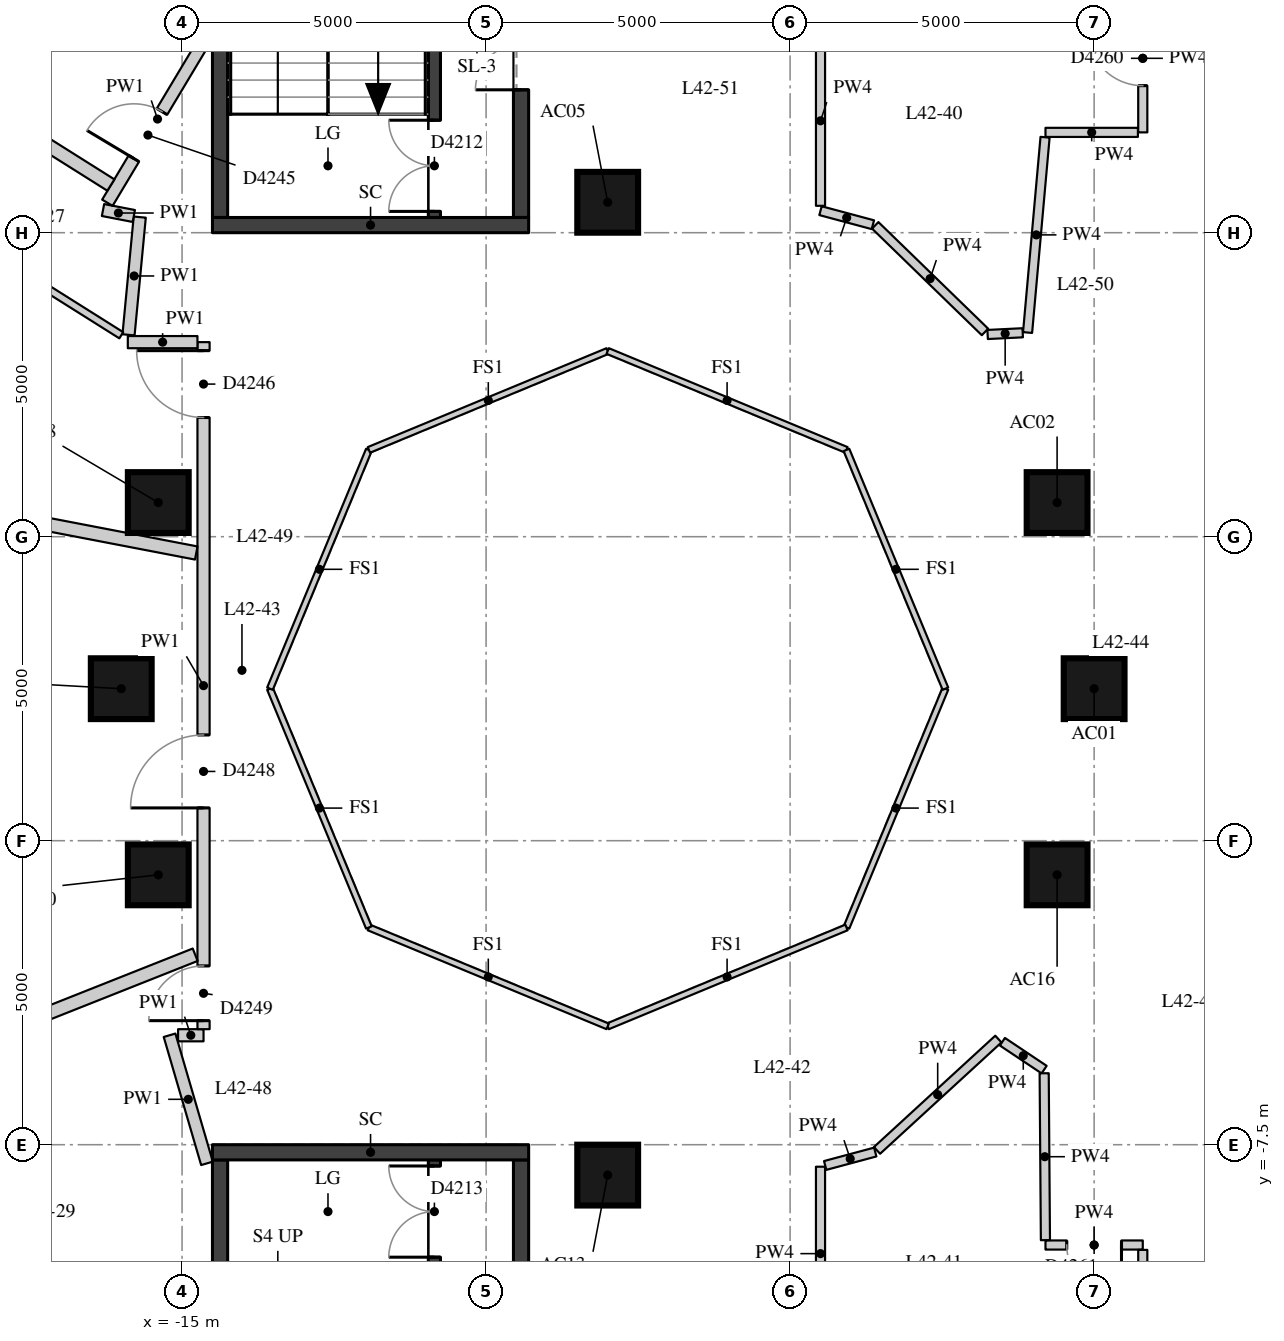
"""IFC4 building model, lengths in metres.
Left out: names, types, materials, properties, quantities, classifications, styles, units other than length and angle.
Written with IfcOpenShell. Run it as: python <this file> out.ifc"""

import sys

from ifc_helpers import new_model, si_unit, direction, frame, frame_2d, origin, origin_2d, place, context, subcontext, project, spatial, rectangle, extrude, element, fill, save


model = new_model("IFC4")
c1 = context("Model", 3, precision=1e-05, world=origin(), true_north=direction((0.0, 1.0)))
c2 = subcontext(c1, "Body", "Model", "MODEL_VIEW")
j1 = project(units=[si_unit("LENGTHUNIT", "METRE"), si_unit("PLANEANGLEUNIT", "RADIAN")], contexts=[c1])
p1 = place(None, origin())
s1 = spatial("IfcSite", under=j1, at=p1, CompositionType="ELEMENT")
p2 = place(p1, origin())
s2 = spatial("IfcBuilding", under=s1, at=p2, CompositionType="ELEMENT")
p3 = place(p2, frame((0.0, 0.0, 151.7)))
s3 = spatial("IfcBuildingStorey", under=s2, at=p3, CompositionType="ELEMENT", Elevation=151.7)
for number, where, z_axis, x_axis in (
    (1, (0.0, 0.0, 0.0), (0.0, 0.0, 1.0), (1.0, 0.0, 0.0)),
    (2, (-0.609, 3.062, 0.0), (0.0, 0.0, 1.0), (1.0, 0.0, 0.0)),
    (3, (-8.0, 8.0, 0.0), (0.0, 0.0, 1.0), (1.0, 0.0, 0.0)),
    (4, (-15.391, 3.062, 0.0), (0.0, 0.0, 1.0), (1.0, 0.0, 0.0)),
    (5, (-16.0, 0.0, 0.0), (0.0, 0.0, 1.0), (1.0, 0.0, 0.0)),
    (6, (-15.391, -3.062, 0.0), (0.0, 0.0, 1.0), (1.0, 0.0, 0.0)),
    (7, (-8.0, -8.0, 0.0), (0.0, 0.0, 1.0), (1.0, 0.0, 0.0)),
    (8, (-0.609, -3.062, 0.0), (0.0, 0.0, 1.0), (1.0, 0.0, 0.0)),
):
    element("IfcColumn", number, at=place(p3, frame(where, z_axis=z_axis, x_axis=x_axis)), inside=s3, PredefinedType="COLUMN", context=c2, shape_type="SweptSolid", body=[
        extrude(rectangle(XDim=1.0, YDim=1.0, at=origin_2d()), origin(), (0.0, 0.0, 1.0), 3.3),
    ])
p4 = place(p3, frame((-10.85, 7.75, 0.0), z_axis=(0.0, 0.0, 1.0), x_axis=(0.0, 1.0, 0.0)))
e9 = element("IfcWall", 9, at=p4, inside=s3, PredefinedType="SHEAR", context=c2, shape_type="SweptSolid", body=[
    extrude(rectangle(XDim=6.0, YDim=0.2, at=frame_2d((3.0, 0.0))), origin(), (0.0, 0.0, 1.0), 3.02),
])
p5 = place(p4, frame((0.1, 0.0, 0.0)))
e10 = element("IfcOpeningElement", 10, at=p5, cuts=e9, PredefinedType="OPENING", context=c2, shape_type="SweptSolid", body=[
    extrude(rectangle(XDim=1.5, YDim=2.1, at=frame_2d((0.75, 1.05))), frame((0.0, 0.11, 0.0), z_axis=(0.0, -1.0, 0.0), x_axis=(1.0, 0.0, 0.0)), (0.0, 0.0, 1.0), 0.22),
])
p6 = place(p3, frame((-10.85, -13.75, 0.0), z_axis=(0.0, 0.0, 1.0), x_axis=(0.0, 1.0, 0.0)))
e11 = element("IfcWall", 11, at=p6, inside=s3, PredefinedType="SHEAR", context=c2, shape_type="SweptSolid", body=[
    extrude(rectangle(XDim=6.0, YDim=0.2, at=frame_2d((3.0, 0.0))), origin(), (0.0, 0.0, 1.0), 3.02),
])
p7 = place(p6, frame((4.4, 0.0, 0.0)))
e12 = element("IfcOpeningElement", 12, at=p7, cuts=e11, PredefinedType="OPENING", context=c2, shape_type="SweptSolid", body=[
    extrude(rectangle(XDim=1.5, YDim=2.1, at=frame_2d((0.75, 1.05))), frame((0.0, 0.11, 0.0), z_axis=(0.0, -1.0, 0.0), x_axis=(1.0, 0.0, 0.0)), (0.0, 0.0, 1.0), 0.22),
])
p8 = place(p3, frame((-14.375, 7.75, -0.28), z_axis=(0.0, 0.0, 1.0), x_axis=(0.0, 1.0, 0.0)))
e13 = element("IfcWall", 13, at=p8, inside=s3, PredefinedType="SHEAR", context=c2, shape_type="SweptSolid", body=[
    extrude(rectangle(XDim=6.0, YDim=0.25, at=frame_2d((3.0, 0.0))), origin(), (0.0, 0.0, 1.0), 3.3),
])
p9 = place(p3, frame((-9.425, 7.75, -0.28), z_axis=(0.0, 0.0, 1.0), x_axis=(0.0, 1.0, 0.0)))
e14 = element("IfcWall", 14, at=p9, inside=s3, PredefinedType="SHEAR", context=c2, shape_type="SweptSolid", body=[
    extrude(rectangle(XDim=6.0, YDim=0.25, at=frame_2d((3.0, 0.0))), origin(), (0.0, 0.0, 1.0), 3.3),
])
p10 = place(p9, frame((2.1, 0.0, 0.28)))
e15 = element("IfcOpeningElement", 15, at=p10, cuts=e14, PredefinedType="OPENING", context=c2, shape_type="SweptSolid", body=[
    extrude(rectangle(XDim=1.5, YDim=2.1, at=frame_2d((0.75, 1.05))), frame((0.0, 0.135, 0.0), z_axis=(0.0, -1.0, 0.0), x_axis=(1.0, 0.0, 0.0)), (0.0, 0.0, 1.0), 0.27),
])
p11 = place(p3, frame((-14.5, 7.625, -0.28), z_axis=(0.0, 0.0, 1.0), x_axis=(1.0, 0.0, 0.0)))
e16 = element("IfcWall", 16, at=p11, inside=s3, PredefinedType="SHEAR", context=c2, shape_type="SweptSolid", body=[
    extrude(rectangle(XDim=5.2, YDim=0.25, at=frame_2d((2.6, 0.0))), origin(), (0.0, 0.0, 1.0), 3.3),
])
p12 = place(p3, frame((-14.375, -13.75, -0.28), z_axis=(0.0, 0.0, 1.0), x_axis=(0.0, 1.0, 0.0)))
e17 = element("IfcWall", 17, at=p12, inside=s3, PredefinedType="SHEAR", context=c2, shape_type="SweptSolid", body=[
    extrude(rectangle(XDim=6.0, YDim=0.25, at=frame_2d((3.0, 0.0))), origin(), (0.0, 0.0, 1.0), 3.3),
])
p13 = place(p3, frame((-9.425, -13.75, -0.28), z_axis=(0.0, 0.0, 1.0), x_axis=(0.0, 1.0, 0.0)))
e18 = element("IfcWall", 18, at=p13, inside=s3, PredefinedType="SHEAR", context=c2, shape_type="SweptSolid", body=[
    extrude(rectangle(XDim=6.0, YDim=0.25, at=frame_2d((3.0, 0.0))), origin(), (0.0, 0.0, 1.0), 3.3),
])
p14 = place(p13, frame((2.4, 0.0, 0.28)))
e19 = element("IfcOpeningElement", 19, at=p14, cuts=e18, PredefinedType="OPENING", context=c2, shape_type="SweptSolid", body=[
    extrude(rectangle(XDim=1.5, YDim=2.1, at=frame_2d((0.75, 1.05))), frame((0.0, 0.135, 0.0), z_axis=(0.0, -1.0, 0.0), x_axis=(1.0, 0.0, 0.0)), (0.0, 0.0, 1.0), 0.27),
])
p15 = place(p3, frame((-14.5, -7.625, -0.28), z_axis=(0.0, 0.0, 1.0), x_axis=(1.0, 0.0, 0.0)))
e20 = element("IfcWall", 20, at=p15, inside=s3, PredefinedType="SHEAR", context=c2, shape_type="SweptSolid", body=[
    extrude(rectangle(XDim=5.2, YDim=0.25, at=frame_2d((2.6, 0.0))), origin(), (0.0, 0.0, 1.0), 3.3),
])
p16 = place(p3, frame((-14.59, -7.807, 0.0), z_axis=(0.0, 0.0, 1.0), x_axis=(-0.280401457903, 0.959882817018, 0.0)))
e21 = element("IfcWall", 21, at=p16, inside=s3, PredefinedType="PARTITIONING", context=c2, shape_type="SweptSolid", body=[
    extrude(rectangle(XDim=2.195, YDim=0.2, at=frame_2d((1.098, 0.0))), origin(), (0.0, 0.0, 1.0), 3.02),
])
p17 = place(p3, frame((-15.065, -5.7, 0.0), z_axis=(0.0, 0.0, 1.0), x_axis=(1.0, 0.0, 0.0)))
e22 = element("IfcWall", 22, at=p17, inside=s3, PredefinedType="PARTITIONING", context=c2, shape_type="SweptSolid", body=[
    extrude(rectangle(XDim=0.419, YDim=0.2, at=frame_2d((0.209, 0.0))), origin(), (0.0, 0.0, 1.0), 3.02),
])
p18 = place(p3, frame((-14.647, -5.6, 0.0), z_axis=(0.0, 0.0, 1.0), x_axis=(0.0, 1.0, 0.0)))
e23 = element("IfcWall", 23, at=p18, inside=s3, PredefinedType="PARTITIONING", context=c2, shape_type="SweptSolid", body=[
    extrude(rectangle(XDim=11.3, YDim=0.2, at=frame_2d((5.65, 0.0))), origin(), (0.0, 0.0, 1.0), 3.02),
])
p19 = place(p18, frame((10.06, 0.0, 0.0)))
e24 = element("IfcOpeningElement", 24, at=p19, cuts=e23, PredefinedType="OPENING", context=c2, shape_type="SweptSolid", body=[
    extrude(rectangle(XDim=1.1, YDim=2.1, at=frame_2d((0.55, 1.05))), frame((0.0, 0.11, 0.0), z_axis=(0.0, -1.0, 0.0), x_axis=(1.0, 0.0, 0.0)), (0.0, 0.0, 1.0), 0.22),
])
p20 = place(p18, frame((3.639, 0.0, 0.0)))
e25 = element("IfcOpeningElement", 25, at=p20, cuts=e23, PredefinedType="OPENING", context=c2, shape_type="SweptSolid", body=[
    extrude(rectangle(XDim=1.2, YDim=2.1, at=frame_2d((0.6, 1.05))), frame((0.0, 0.11, 0.0), z_axis=(0.0, -1.0, 0.0), x_axis=(1.0, 0.0, 0.0)), (0.0, 0.0, 1.0), 0.22),
])
p21 = place(p18, frame((0.14, 0.0, 0.0)))
e26 = element("IfcOpeningElement", 26, at=p21, cuts=e23, PredefinedType="OPENING", context=c2, shape_type="SweptSolid", body=[
    extrude(rectangle(XDim=0.9, YDim=2.1, at=frame_2d((0.45, 1.05))), frame((0.0, 0.11, 0.0), z_axis=(0.0, -1.0, 0.0), x_axis=(1.0, 0.0, 0.0)), (0.0, 0.0, 1.0), 0.22),
])
p22 = place(p3, frame((-14.747, 5.7, 0.0), z_axis=(0.0, 0.0, 1.0), x_axis=(-1.0, 0.0, 0.0)))
e27 = element("IfcWall", 27, at=p22, inside=s3, PredefinedType="PARTITIONING", context=c2, shape_type="SweptSolid", body=[
    extrude(rectangle(XDim=1.145, YDim=0.2, at=frame_2d((0.573, 0.0))), origin(), (0.0, 0.0, 1.0), 3.02),
])
p23 = place(p3, frame((-15.88, 5.82, 0.0), z_axis=(0.0, 0.0, 1.0), x_axis=(0.094892019157, 0.995487571344, 0.0)))
e28 = element("IfcWall", 28, at=p23, inside=s3, PredefinedType="PARTITIONING", context=c2, shape_type="SweptSolid", body=[
    extrude(rectangle(XDim=1.945, YDim=0.2, at=frame_2d((0.973, 0.0))), origin(), (0.0, 0.0, 1.0), 3.02),
])
p24 = place(p3, frame((-15.793, 7.775, 0.0), z_axis=(0.0, 0.0, 1.0), x_axis=(-0.981833914825, 0.189742361371, 0.0)))
e29 = element("IfcWall", 29, at=p24, inside=s3, PredefinedType="PARTITIONING", context=c2, shape_type="SweptSolid", body=[
    extrude(rectangle(XDim=0.516, YDim=0.2, at=frame_2d((0.258, 0.0))), origin(), (0.0, 0.0, 1.0), 3.02),
])
p25 = place(p3, frame((-16.228, 7.992, 0.0), z_axis=(0.0, 0.0, 1.0), x_axis=(0.513936465122, 0.857828251935, 0.0)))
e30 = element("IfcWall", 30, at=p25, inside=s3, PredefinedType="PARTITIONING", context=c2, shape_type="SweptSolid", body=[
    extrude(rectangle(XDim=3.21, YDim=0.2, at=frame_2d((1.605, 0.0))), origin(), (0.0, 0.0, 1.0), 3.02),
])
p26 = place(p25, frame((0.848, 0.0, 0.0)))
e31 = element("IfcOpeningElement", 31, at=p26, cuts=e30, PredefinedType="OPENING", context=c2, shape_type="SweptSolid", body=[
    extrude(rectangle(XDim=0.9, YDim=2.1, at=frame_2d((0.45, 1.05))), frame((0.0, 0.11, 0.0), z_axis=(0.0, -1.0, 0.0), x_axis=(1.0, 0.0, 0.0)), (0.0, 0.0, 1.0), 0.22),
])
p27 = place(p3, frame((0.8, 11.586, 0.0), z_axis=(0.0, 0.0, 1.0), x_axis=(0.0, -1.0, 0.0)))
e32 = element("IfcWall", 32, at=p27, inside=s3, PredefinedType="PARTITIONING", context=c2, shape_type="SweptSolid", body=[
    extrude(rectangle(XDim=2.436, YDim=0.15, at=frame_2d((1.218, 0.0))), origin(), (0.0, 0.0, 1.0), 3.02),
])
p28 = place(p27, frame((0.768, 0.0, 0.0)))
e33 = element("IfcOpeningElement", 33, at=p28, cuts=e32, PredefinedType="OPENING", context=c2, shape_type="SweptSolid", body=[
    extrude(rectangle(XDim=0.9, YDim=2.1, at=frame_2d((0.45, 1.05))), frame((0.0, 0.085, 0.0), z_axis=(0.0, -1.0, 0.0), x_axis=(1.0, 0.0, 0.0)), (0.0, 0.0, 1.0), 0.17),
])
p29 = place(p3, frame((0.72, 9.15, 0.0), z_axis=(0.0, 0.0, 1.0), x_axis=(-1.0, 0.0, 0.0)))
e34 = element("IfcWall", 34, at=p29, inside=s3, PredefinedType="PARTITIONING", context=c2, shape_type="SweptSolid", body=[
    extrude(rectangle(XDim=1.52, YDim=0.15, at=frame_2d((0.76, 0.0))), origin(), (0.0, 0.0, 1.0), 3.02),
])
p30 = place(p3, frame((-0.807, 9.07, 0.0), z_axis=(0.0, 0.0, 1.0), x_axis=(-0.089184087733, -0.996015159772, 0.0)))
e35 = element("IfcWall", 35, at=p30, inside=s3, PredefinedType="PARTITIONING", context=c2, shape_type="SweptSolid", body=[
    extrude(rectangle(XDim=3.225, YDim=0.15, at=frame_2d((1.612, 0.0))), origin(), (0.0, 0.0, 1.0), 3.02),
])
p31 = place(p3, frame((-1.175, 5.854, 0.0), z_axis=(0.0, 0.0, 1.0), x_axis=(-0.998798267986, -0.049010405705, 0.0)))
e36 = element("IfcWall", 36, at=p31, inside=s3, PredefinedType="PARTITIONING", context=c2, shape_type="SweptSolid", body=[
    extrude(rectangle(XDim=0.578, YDim=0.15, at=frame_2d((0.289, 0.0))), origin(), (0.0, 0.0, 1.0), 3.02),
])
p32 = place(p3, frame((-1.795, 5.867, 0.0), z_axis=(0.0, 0.0, 1.0), x_axis=(-0.717315398231, 0.696748605639, 0.0)))
e37 = element("IfcWall", 37, at=p32, inside=s3, PredefinedType="PARTITIONING", context=c2, shape_type="SweptSolid", body=[
    extrude(rectangle(XDim=2.517, YDim=0.15, at=frame_2d((1.258, 0.0))), origin(), (0.0, 0.0, 1.0), 3.02),
])
p33 = place(p3, frame((-3.639, 7.631, 0.0), z_axis=(0.0, 0.0, 1.0), x_axis=(-0.965879594242, 0.258991523853, 0.0)))
e38 = element("IfcWall", 38, at=p33, inside=s3, PredefinedType="PARTITIONING", context=c2, shape_type="SweptSolid", body=[
    extrude(rectangle(XDim=0.892, YDim=0.15, at=frame_2d((0.446, 0.0))), origin(), (0.0, 0.0, 1.0), 3.02),
])
p34 = place(p3, frame((-4.5, 7.942, 0.0), z_axis=(0.0, 0.0, 1.0), x_axis=(0.0, 1.0, 0.0)))
e39 = element("IfcWall", 39, at=p34, inside=s3, PredefinedType="PARTITIONING", context=c2, shape_type="SweptSolid", body=[
    extrude(rectangle(XDim=2.796, YDim=0.15, at=frame_2d((1.398, 0.0))), origin(), (0.0, 0.0, 1.0), 3.02),
])
p35 = place(p3, frame((-0.8, -9.15, 0.0), z_axis=(0.0, 0.0, 1.0), x_axis=(1.0, 0.0, 0.0)))
e40 = element("IfcWall", 40, at=p35, inside=s3, PredefinedType="PARTITIONING", context=c2, shape_type="SweptSolid", body=[
    extrude(rectangle(XDim=1.6, YDim=0.15, at=frame_2d((0.8, 0.0))), origin(), (0.0, 0.0, 1.0), 3.02),
])
p36 = place(p35, frame((0.35, 0.0, 0.0)))
e41 = element("IfcOpeningElement", 41, at=p36, cuts=e40, PredefinedType="OPENING", context=c2, shape_type="SweptSolid", body=[
    extrude(rectangle(XDim=0.9, YDim=2.1, at=frame_2d((0.45, 1.05))), frame((0.0, 0.085, 0.0), z_axis=(0.0, -1.0, 0.0), x_axis=(1.0, 0.0, 0.0)), (0.0, 0.0, 1.0), 0.17),
])
p37 = place(p3, frame((0.8, -9.23, 0.0), z_axis=(0.0, 0.0, 1.0), x_axis=(0.0, -1.0, 0.0)))
e42 = element("IfcWall", 42, at=p37, inside=s3, PredefinedType="PARTITIONING", context=c2, shape_type="SweptSolid", body=[
    extrude(rectangle(XDim=2.156, YDim=0.15, at=frame_2d((1.078, 0.0))), origin(), (0.0, 0.0, 1.0), 3.02),
])
p38 = place(p3, frame((-4.5, -10.721, 0.0), z_axis=(0.0, 0.0, 1.0), x_axis=(0.0, 1.0, 0.0)))
e43 = element("IfcWall", 43, at=p38, inside=s3, PredefinedType="PARTITIONING", context=c2, shape_type="SweptSolid", body=[
    extrude(rectangle(XDim=2.859, YDim=0.15, at=frame_2d((1.43, 0.0))), origin(), (0.0, 0.0, 1.0), 3.02),
])
p39 = place(p3, frame((-4.423, -7.842, 0.0), z_axis=(0.0, 0.0, 1.0), x_axis=(0.965853333569, 0.259089440221, 0.0)))
e44 = element("IfcWall", 44, at=p39, inside=s3, PredefinedType="PARTITIONING", context=c2, shape_type="SweptSolid", body=[
    extrude(rectangle(XDim=0.852, YDim=0.15, at=frame_2d((0.426, 0.0))), origin(), (0.0, 0.0, 1.0), 3.02),
])
p40 = place(p3, frame((-3.571, -7.594, 0.0), z_axis=(0.0, 0.0, 1.0), x_axis=(0.736783660812, 0.676128565555, 0.0)))
e45 = element("IfcWall", 45, at=p40, inside=s3, PredefinedType="PARTITIONING", context=c2, shape_type="SweptSolid", body=[
    extrude(rectangle(XDim=2.709, YDim=0.15, at=frame_2d((1.354, 0.0))), origin(), (0.0, 0.0, 1.0), 3.02),
])
p41 = place(p3, frame((-1.509, -5.806, 0.0), z_axis=(0.0, 0.0, 1.0), x_axis=(0.831367153095, -0.55572354346, 0.0)))
e46 = element("IfcWall", 46, at=p41, inside=s3, PredefinedType="PARTITIONING", context=c2, shape_type="SweptSolid", body=[
    extrude(rectangle(XDim=0.825, YDim=0.15, at=frame_2d((0.413, 0.0))), origin(), (0.0, 0.0, 1.0), 3.02),
])
p42 = place(p3, frame((-0.822, -6.325, 0.0), z_axis=(0.0, 0.0, 1.0), x_axis=(0.007471771501, -0.999972085926, 0.0)))
e47 = element("IfcWall", 47, at=p42, inside=s3, PredefinedType="PARTITIONING", context=c2, shape_type="SweptSolid", body=[
    extrude(rectangle(XDim=2.745, YDim=0.15, at=frame_2d((1.372, 0.0))), origin(), (0.0, 0.0, 1.0), 3.02),
])
p43 = place(p3, frame((-19.573, 10.426, 0.0), z_axis=(0.0, 0.0, 1.0), x_axis=(0.846298736827, -0.532708595805, 0.0)))
e48 = element("IfcWall", 48, at=p43, inside=s3, PredefinedType="PARTITIONING", context=c2, shape_type="SweptSolid", body=[
    extrude(rectangle(XDim=4.021, YDim=0.22, at=frame_2d((2.011, 0.0))), origin(), (0.0, 0.0, 1.0), 3.02),
])
p44 = place(p3, frame((-20.932, 3.417, 0.0), z_axis=(0.0, 0.0, 1.0), x_axis=(0.982023362662, -0.188759410856, 0.0)))
e49 = element("IfcWall", 49, at=p44, inside=s3, PredefinedType="PARTITIONING", context=c2, shape_type="SweptSolid", body=[
    extrude(rectangle(XDim=6.278, YDim=0.22, at=frame_2d((3.139, 0.0))), origin(), (0.0, 0.0, 1.0), 2.57),
])
p45 = place(p3, frame((-19.99, -6.441, 0.0), z_axis=(0.0, 0.0, 1.0), x_axis=(0.929507316491, 0.368803672147, 0.0)))
e50 = element("IfcWall", 50, at=p45, inside=s3, PredefinedType="PARTITIONING", context=c2, shape_type="SweptSolid", body=[
    extrude(rectangle(XDim=5.6, YDim=0.22, at=frame_2d((2.8, 0.0))), origin(), (0.0, 0.0, 1.0), 3.02),
])
p46 = place(p3, frame((-16.0, 5.813, 0.0), z_axis=(0.0, 0.0, 1.0), x_axis=(-0.846339825068, 0.53264331452, 0.0)))
e51 = element("IfcWall", 51, at=p46, inside=s3, PredefinedType="PARTITIONING", context=c2, shape_type="SweptSolid", body=[
    extrude(rectangle(XDim=3.582, YDim=0.12, at=frame_2d((1.791, 0.0))), origin(), (0.0, 0.0, 1.0), 3.02),
])
for number, where, z_axis, x_axis in (
    (52, (-2.446, 0.0, 0.0), (0.0, 0.0, 1.0), (-0.383, -0.924, 0.0)),
    (53, (-4.073, -3.927, 0.0), (0.0, 0.0, 1.0), (-0.924, -0.383, 0.0)),
    (54, (-8.0, -5.554, 0.0), (0.0, 0.0, 1.0), (-0.924, 0.383, 0.0)),
    (55, (-11.927, -3.927, 0.0), (0.0, 0.0, 1.0), (-0.383, 0.924, 0.0)),
    (56, (-13.554, 0.0, 0.0), (0.0, 0.0, 1.0), (0.383, 0.924, 0.0)),
    (57, (-11.927, 3.927, 0.0), (0.0, 0.0, 1.0), (0.924, 0.383, 0.0)),
    (58, (-8.0, 5.554, 0.0), (0.0, 0.0, 1.0), (0.924, -0.383, 0.0)),
    (59, (-4.073, 3.927, 0.0), (0.0, 0.0, 1.0), (0.383, -0.924, 0.0)),
):
    element("IfcWall", number, at=place(p3, frame(where, z_axis=z_axis, x_axis=x_axis)), inside=s3, PredefinedType="PARTITIONING", context=c2, shape_type="SweptSolid", body=[
        extrude(rectangle(XDim=4.251, YDim=0.1, at=frame_2d((2.125, 0.0))), origin(), (0.0, 0.0, 1.0), 3.02),
    ])
p47 = place(p5, origin())
e60 = element("IfcDoor", 60, at=p47, inside=s3, OperationType="DOUBLE_DOOR_SINGLE_SWING", PredefinedType="DOOR", context=c2, shape_type="SweptSolid", body=[
    extrude(rectangle(XDim=1.5, YDim=2.1, at=frame_2d((0.75, 1.05))), frame((0.0, 0.025, 0.0), z_axis=(0.0, -1.0, 0.0), x_axis=(1.0, 0.0, 0.0)), (0.0, 0.0, 1.0), 0.05),
])
fill(e10, e60)
p48 = place(p7, origin())
e61 = element("IfcDoor", 61, at=p48, inside=s3, OperationType="DOUBLE_DOOR_SINGLE_SWING", PredefinedType="DOOR", context=c2, shape_type="SweptSolid", body=[
    extrude(rectangle(XDim=1.5, YDim=2.1, at=frame_2d((0.75, 1.05))), frame((0.0, 0.025, 0.0), z_axis=(0.0, -1.0, 0.0), x_axis=(1.0, 0.0, 0.0)), (0.0, 0.0, 1.0), 0.05),
])
fill(e12, e61)
p49 = place(p10, origin())
e62 = element("IfcDoor", 62, at=p49, inside=s3, OperationType="DOUBLE_DOOR_SINGLE_SWING", PredefinedType="DOOR", context=c2, shape_type="SweptSolid", body=[
    extrude(rectangle(XDim=1.5, YDim=2.1, at=frame_2d((0.75, 1.05))), frame((0.0, 0.025, 0.0), z_axis=(0.0, -1.0, 0.0), x_axis=(1.0, 0.0, 0.0)), (0.0, 0.0, 1.0), 0.05),
])
fill(e15, e62)
p50 = place(p26, origin())
e63 = element("IfcDoor", 63, at=p50, inside=s3, OperationType="SINGLE_SWING_LEFT", PredefinedType="DOOR", context=c2, shape_type="SweptSolid", body=[
    extrude(rectangle(XDim=0.9, YDim=2.1, at=frame_2d((0.45, 1.05))), frame((0.0, 0.025, 0.0), z_axis=(0.0, -1.0, 0.0), x_axis=(1.0, 0.0, 0.0)), (0.0, 0.0, 1.0), 0.05),
])
fill(e31, e63)
p51 = place(p19, origin())
e64 = element("IfcDoor", 64, at=p51, inside=s3, OperationType="SINGLE_SWING_RIGHT", PredefinedType="DOOR", context=c2, shape_type="SweptSolid", body=[
    extrude(rectangle(XDim=1.1, YDim=2.1, at=frame_2d((0.55, 1.05))), frame((0.0, 0.025, 0.0), z_axis=(0.0, -1.0, 0.0), x_axis=(1.0, 0.0, 0.0)), (0.0, 0.0, 1.0), 0.05),
])
fill(e24, e64)
p52 = place(p20, origin())
e65 = element("IfcDoor", 65, at=p52, inside=s3, OperationType="SINGLE_SWING_LEFT", PredefinedType="DOOR", context=c2, shape_type="SweptSolid", body=[
    extrude(rectangle(XDim=1.2, YDim=2.1, at=frame_2d((0.6, 1.05))), frame((0.0, 0.025, 0.0), z_axis=(0.0, -1.0, 0.0), x_axis=(1.0, 0.0, 0.0)), (0.0, 0.0, 1.0), 0.05),
])
fill(e25, e65)
p53 = place(p21, origin())
e66 = element("IfcDoor", 66, at=p53, inside=s3, OperationType="SINGLE_SWING_LEFT", PredefinedType="DOOR", context=c2, shape_type="SweptSolid", body=[
    extrude(rectangle(XDim=0.9, YDim=2.1, at=frame_2d((0.45, 1.05))), frame((0.0, 0.025, 0.0), z_axis=(0.0, -1.0, 0.0), x_axis=(1.0, 0.0, 0.0)), (0.0, 0.0, 1.0), 0.05),
])
fill(e26, e66)
p54 = place(p28, origin())
e67 = element("IfcDoor", 67, at=p54, inside=s3, OperationType="SINGLE_SWING_RIGHT", PredefinedType="DOOR", context=c2, shape_type="SweptSolid", body=[
    extrude(rectangle(XDim=0.9, YDim=2.1, at=frame_2d((0.45, 1.05))), frame((0.0, 0.025, 0.0), z_axis=(0.0, -1.0, 0.0), x_axis=(1.0, 0.0, 0.0)), (0.0, 0.0, 1.0), 0.05),
])
fill(e33, e67)
p55 = place(p36, origin())
e68 = element("IfcDoor", 68, at=p55, inside=s3, OperationType="SINGLE_SWING_LEFT", PredefinedType="DOOR", context=c2, shape_type="SweptSolid", body=[
    extrude(rectangle(XDim=0.9, YDim=2.1, at=frame_2d((0.45, 1.05))), frame((0.0, 0.025, 0.0), z_axis=(0.0, -1.0, 0.0), x_axis=(1.0, 0.0, 0.0)), (0.0, 0.0, 1.0), 0.05),
])
fill(e41, e68)
save(model, sys.argv[1])
